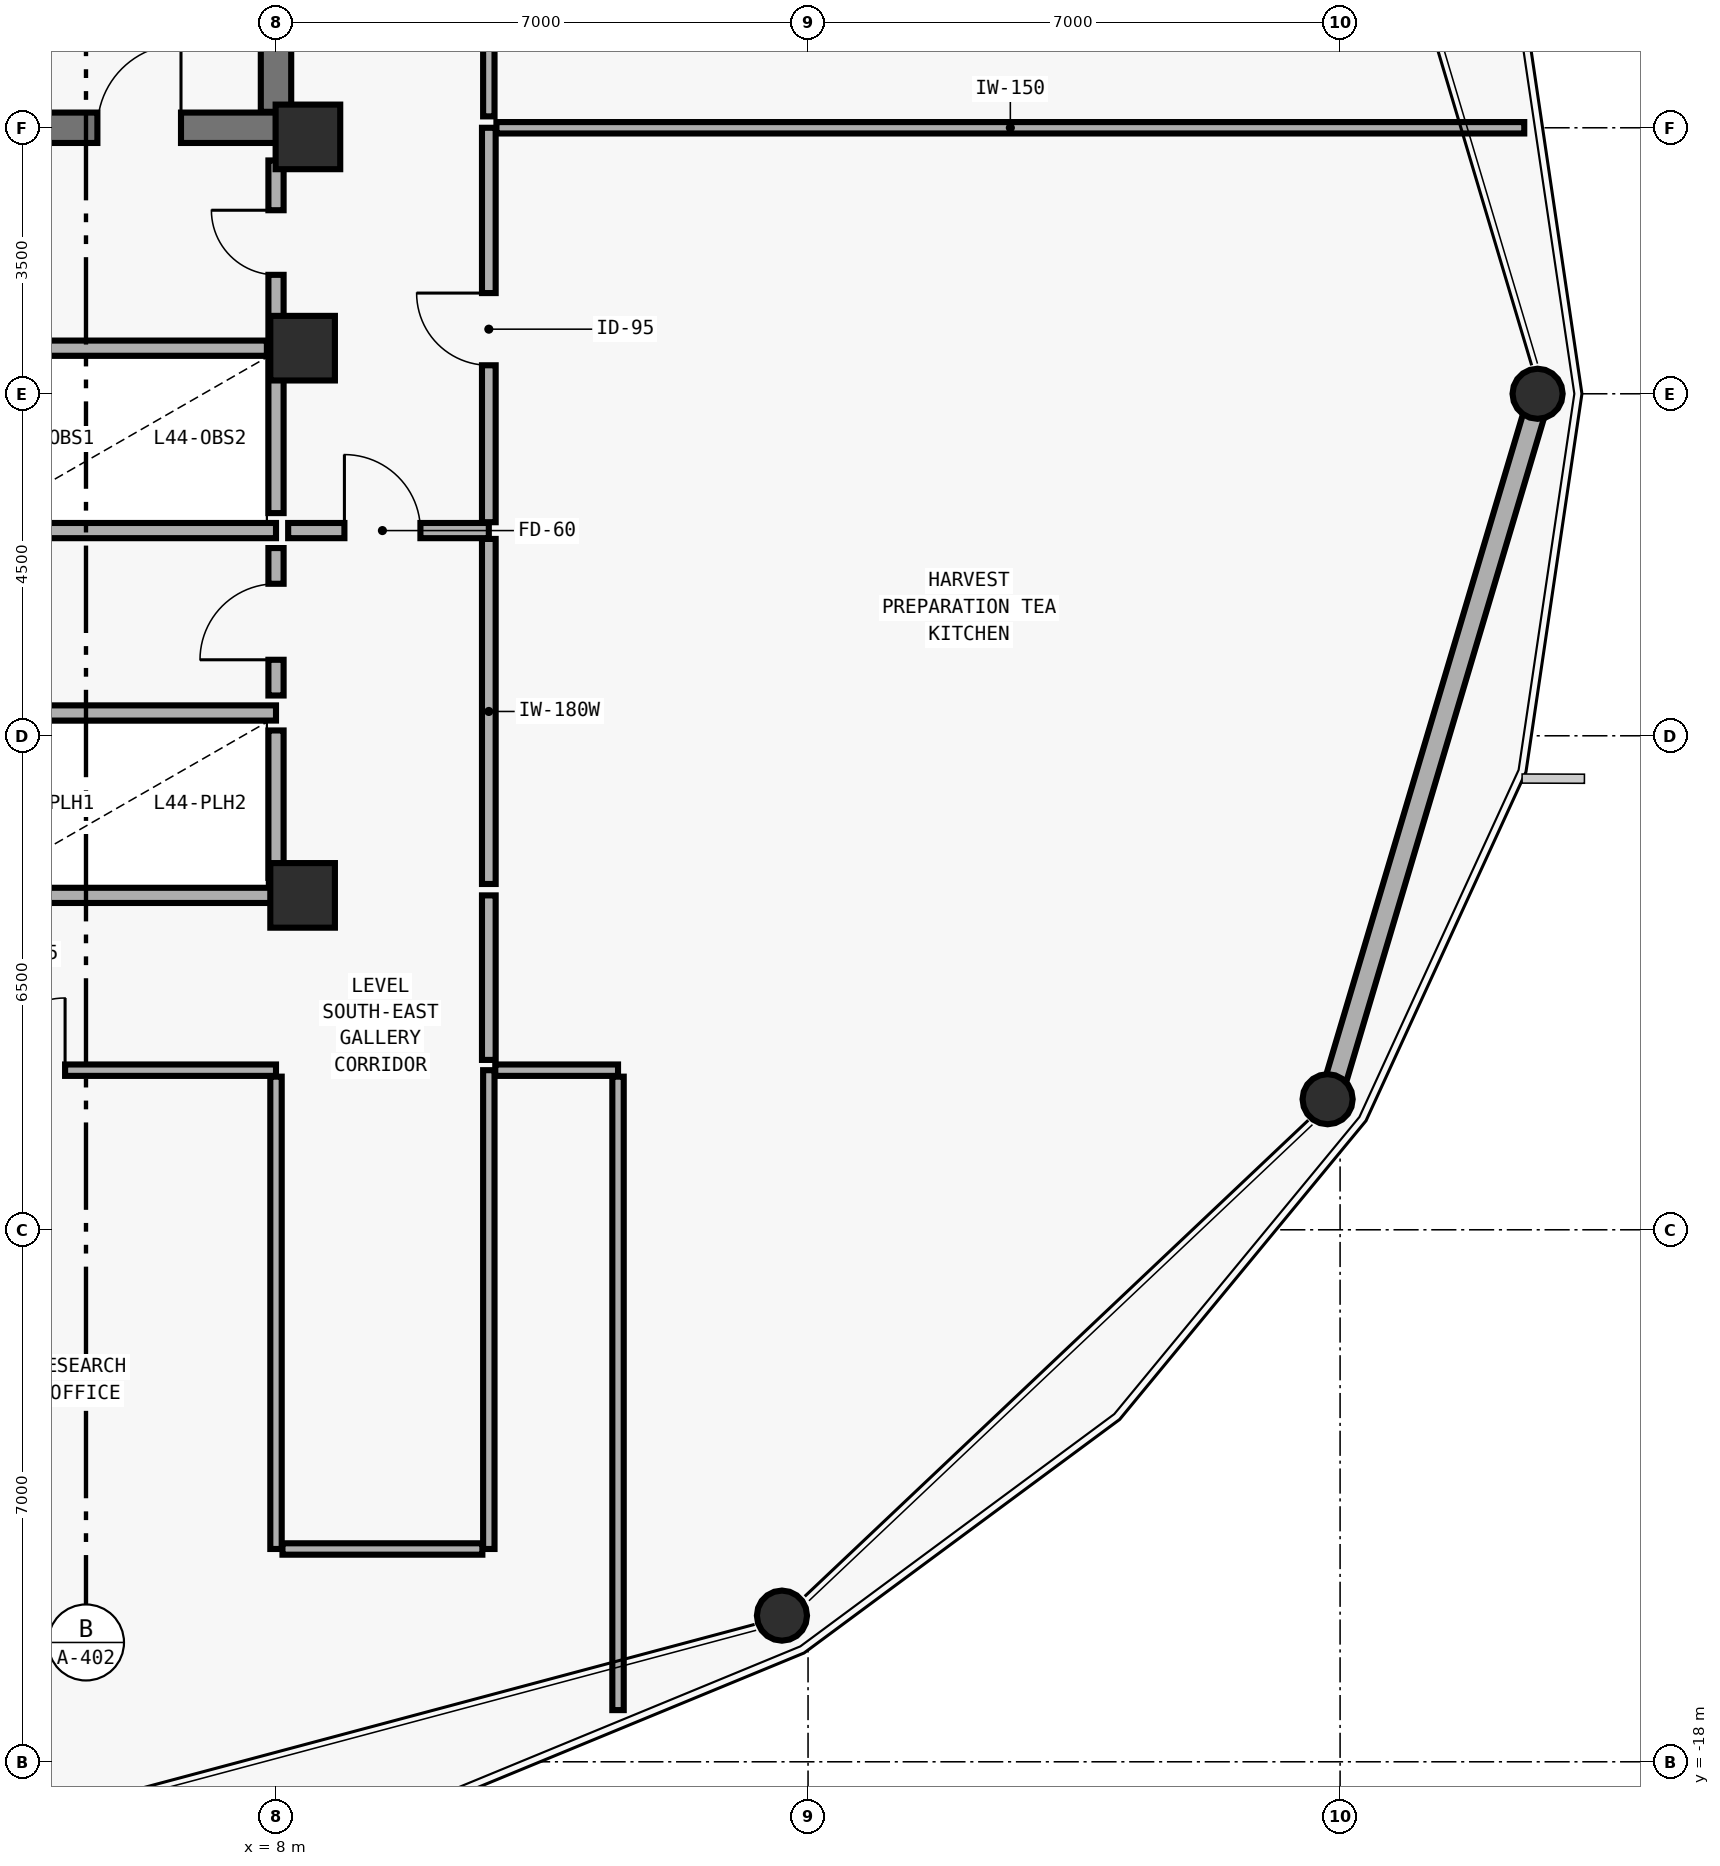
"""IFC4 building model, lengths in metres.
Left out: names, types, materials, properties, quantities, classifications, styles, units other than length and angle.
Written with IfcOpenShell. Run it as: python <this file> out.ifc"""

import sys

from ifc_helpers import new_model, si_unit, direction, frame, frame_2d, origin, origin_2d, place, context, subcontext, project, spatial, rectangle, hollow_circle, extrude, element, fill, save


model = new_model("IFC4")
c1 = context("Model", 3, precision=1e-05, world=origin(), true_north=direction((0.0, 1.0)))
c2 = subcontext(c1, "Body", "Model", "MODEL_VIEW")
j1 = project(units=[si_unit("LENGTHUNIT", "METRE"), si_unit("PLANEANGLEUNIT", "RADIAN")], contexts=[c1])
p1 = place(None, origin())
s1 = spatial("IfcSite", under=j1, at=p1, CompositionType="ELEMENT")
p2 = place(p1, origin())
s2 = spatial("IfcBuilding", under=s1, at=p2, CompositionType="ELEMENT")
p3 = place(p2, frame((0.0, 0.0, 178.8)))
s3 = spatial("IfcBuildingStorey", under=s2, at=p3, CompositionType="ELEMENT", Elevation=178.8)
p4 = place(p3, frame((-2.0, 3.5, 0.0), z_axis=(0.0, 0.0, 1.0), x_axis=(1.0, 0.0, 0.0)))
e1 = element("IfcWall", 1, at=p4, inside=s3, PredefinedType="SHEAR", context=c2, shape_type="SweptSolid", body=[
    extrude(rectangle(XDim=10.0, YDim=0.4, at=frame_2d((5.0, 0.0))), origin(), (0.0, 0.0, 1.0), 3.592),
])
p5 = place(p4, frame((1.65, 0.0, 0.0)))
e2 = element("IfcOpeningElement", 2, at=p5, cuts=e1, PredefinedType="OPENING", context=c2, shape_type="SweptSolid", body=[
    extrude(rectangle(XDim=1.1, YDim=2.15, at=frame_2d((0.55, 1.075))), frame((0.0, 0.21, 0.0), z_axis=(0.0, -1.0, 0.0), x_axis=(1.0, 0.0, 0.0)), (0.0, 0.0, 1.0), 0.42),
])
p6 = place(p4, frame((7.65, 0.0, 0.0)))
e3 = element("IfcOpeningElement", 3, at=p6, cuts=e1, PredefinedType="OPENING", context=c2, shape_type="SweptSolid", body=[
    extrude(rectangle(XDim=1.1, YDim=2.15, at=frame_2d((0.55, 1.075))), frame((0.0, 0.21, 0.0), z_axis=(0.0, -1.0, 0.0), x_axis=(1.0, 0.0, 0.0)), (0.0, 0.0, 1.0), 0.42),
])
p7 = place(p4, frame((3.72, 0.0, 0.0)))
e4 = element("IfcOpeningElement", 4, at=p7, cuts=e1, PredefinedType="OPENING", context=c2, shape_type="SweptSolid", body=[
    extrude(rectangle(XDim=1.1, YDim=2.2, at=frame_2d((0.55, 1.1))), frame((0.0, 0.21, 0.0), z_axis=(0.0, -1.0, 0.0), x_axis=(1.0, 0.0, 0.0)), (0.0, 0.0, 1.0), 0.42),
])
p8 = place(p4, frame((5.18, 0.0, 0.0)))
e5 = element("IfcOpeningElement", 5, at=p8, cuts=e1, PredefinedType="OPENING", context=c2, shape_type="SweptSolid", body=[
    extrude(rectangle(XDim=1.1, YDim=2.2, at=frame_2d((0.55, 1.1))), frame((0.0, 0.21, 0.0), z_axis=(0.0, -1.0, 0.0), x_axis=(1.0, 0.0, 0.0)), (0.0, 0.0, 1.0), 0.42),
])
p9 = place(p3, frame((8.0, 3.71, 0.0), z_axis=(0.0, 0.0, 1.0), x_axis=(0.0, 1.0, 0.0)))
e6 = element("IfcWall", 6, at=p9, inside=s3, PredefinedType="SHEAR", context=c2, shape_type="SweptSolid", body=[
    extrude(rectangle(XDim=8.58, YDim=0.4, at=frame_2d((4.29, 0.0))), origin(), (0.0, 0.0, 1.0), 3.592),
])
for number, where, z_axis, x_axis in (
    (7, (8.42, 3.38, 0.0), (0.0, 0.0, 1.0), (1.0, 0.0, 0.0)),
    (8, (8.35, 0.6, 0.0), (0.0, 0.0, 1.0), (1.0, 0.0, 0.0)),
    (9, (8.35, -6.6, 0.0), (0.0, 0.0, 1.0), (1.0, 0.0, 0.0)),
):
    element("IfcColumn", number, at=place(p3, frame(where, z_axis=z_axis, x_axis=x_axis)), inside=s3, PredefinedType="COLUMN", context=c2, shape_type="SweptSolid", body=[
        extrude(rectangle(XDim=0.85, YDim=0.85, at=origin_2d()), origin(), (0.0, 0.0, 1.0), 3.575),
    ])
p10 = place(p3, frame((24.632, 0.0, 0.0), z_axis=(-0.018776993553, 0.0, 0.999823696715), x_axis=(0.0, -1.0, 0.0)))
e10 = element("IfcColumn", 10, at=p10, inside=s3, PredefinedType="COLUMN", context=c2, shape_type="SweptSolid", body=[
    extrude(hollow_circle(Radius=0.33, WallThickness=0.025, at=origin_2d()), origin(), (0.0, 0.0, 1.0), 3.576),
])
p11 = place(p3, frame((14.674, -16.092, 0.0), z_axis=(-0.009423563403, 0.008194402959, 0.999922021066), x_axis=(-0.656178714925, -0.754605522164, 0.0)))
e11 = element("IfcColumn", 11, at=p11, inside=s3, PredefinedType="COLUMN", context=c2, shape_type="SweptSolid", body=[
    extrude(hollow_circle(Radius=0.33, WallThickness=0.025, at=origin_2d()), origin(), (0.0, 0.0, 1.0), 3.575),
])
p12 = place(p3, frame((21.865, -9.291, 0.0), z_axis=(-0.016182903558, 0.004779760545, 0.999857623625), x_axis=(-0.283261555535, -0.959042695168, 0.0)))
e12 = element("IfcColumn", 12, at=p12, inside=s3, PredefinedType="COLUMN", context=c2, shape_type="SweptSolid", body=[
    extrude(hollow_circle(Radius=0.33, WallThickness=0.025, at=origin_2d()), origin(), (0.0, 0.0, 1.0), 3.575),
])
p13 = place(p3, frame((24.551, -0.273, 0.0), z_axis=(0.0, 0.0, 1.0), x_axis=(-0.285437365911, -0.958397365471, 0.0)))
e13 = element("IfcWall", 13, at=p13, inside=s3, PredefinedType="SOLIDWALL", context=c2, shape_type="SweptSolid", body=[
    extrude(rectangle(XDim=9.124, YDim=0.28, at=frame_2d((4.562, 0.0))), origin(), (0.0, 0.0, 1.0), 2.93),
])
p14 = place(p3, frame((4.0, 0.6, 0.0), z_axis=(0.0, 0.0, 1.0), x_axis=(1.0, 0.0, 0.0)))
e14 = element("IfcWall", 14, at=p14, inside=s3, PredefinedType="SOLIDWALL", context=c2, shape_type="SweptSolid", body=[
    extrude(rectangle(XDim=3.88, YDim=0.2, at=frame_2d((1.94, 0.0))), origin(), (0.0, 0.0, 1.0), 3.012),
])
p15 = place(p3, frame((4.0, -1.8, 0.0), z_axis=(0.0, 0.0, 1.0), x_axis=(1.0, 0.0, 0.0)))
e15 = element("IfcWall", 15, at=p15, inside=s3, PredefinedType="SOLIDWALL", context=c2, shape_type="SweptSolid", body=[
    extrude(rectangle(XDim=4.0, YDim=0.2, at=frame_2d((2.0, 0.0))), origin(), (0.0, 0.0, 1.0), 3.36),
])
p16 = place(p3, frame((8.0, -1.57, 0.0), z_axis=(0.0, 0.0, 1.0), x_axis=(0.0, 1.0, 0.0)))
e16 = element("IfcWall", 16, at=p16, inside=s3, PredefinedType="SOLIDWALL", context=c2, shape_type="SweptSolid", body=[
    extrude(rectangle(XDim=2.05, YDim=0.2, at=frame_2d((1.025, 0.0))), origin(), (0.0, 0.0, 1.0), 3.012),
])
p17 = place(p3, frame((4.16, -4.2, 0.0), z_axis=(0.0, 0.0, 1.0), x_axis=(1.0, 0.0, 0.0)))
e17 = element("IfcWall", 17, at=p17, inside=s3, PredefinedType="SOLIDWALL", context=c2, shape_type="SweptSolid", body=[
    extrude(rectangle(XDim=3.84, YDim=0.2, at=frame_2d((1.92, 0.0))), origin(), (0.0, 0.0, 1.0), 3.36),
])
p18 = place(p3, frame((4.16, -6.6, 0.0), z_axis=(0.0, 0.0, 1.0), x_axis=(1.0, 0.0, 0.0)))
e18 = element("IfcWall", 18, at=p18, inside=s3, PredefinedType="SOLIDWALL", context=c2, shape_type="SweptSolid", body=[
    extrude(rectangle(XDim=3.84, YDim=0.2, at=frame_2d((1.92, 0.0))), origin(), (0.0, 0.0, 1.0), 3.012),
])
p19 = place(p3, frame((8.0, -6.37, 0.0), z_axis=(0.0, 0.0, 1.0), x_axis=(0.0, 1.0, 0.0)))
e19 = element("IfcWall", 19, at=p19, inside=s3, PredefinedType="SOLIDWALL", context=c2, shape_type="SweptSolid", body=[
    extrude(rectangle(XDim=1.94, YDim=0.2, at=frame_2d((0.97, 0.0))), origin(), (0.0, 0.0, 1.0), 3.012),
])
p20 = place(p3, frame((8.0, 0.72, 0.0), z_axis=(0.0, 0.0, 1.0), x_axis=(0.0, 1.0, 0.0)))
e20 = element("IfcWall", 20, at=p20, inside=s3, PredefinedType="MOVABLE", context=c2, shape_type="SweptSolid", body=[
    extrude(rectangle(XDim=2.35, YDim=0.2, at=frame_2d((1.175, 0.0))), origin(), (0.0, 0.0, 1.0), 2.692),
])
p21 = place(p20, frame((0.845, 0.0, 0.0)))
e21 = element("IfcOpeningElement", 21, at=p21, cuts=e20, PredefinedType="OPENING", context=c2, shape_type="SweptSolid", body=[
    extrude(rectangle(XDim=0.85, YDim=2.1, at=frame_2d((0.425, 1.05))), frame((0.0, 0.11, 0.0), z_axis=(0.0, -1.0, 0.0), x_axis=(1.0, 0.0, 0.0)), (0.0, 0.0, 1.0), 0.22),
])
p22 = place(p3, frame((8.0, -3.97, 0.0), z_axis=(0.0, 0.0, 1.0), x_axis=(0.0, 1.0, 0.0)))
e22 = element("IfcWall", 22, at=p22, inside=s3, PredefinedType="MOVABLE", context=c2, shape_type="SweptSolid", body=[
    extrude(rectangle(XDim=1.94, YDim=0.2, at=frame_2d((0.97, 0.0))), origin(), (0.0, 0.0, 1.0), 3.012),
])
p23 = place(p22, frame((0.47, 0.0, 0.0)))
e23 = element("IfcOpeningElement", 23, at=p23, cuts=e22, PredefinedType="OPENING", context=c2, shape_type="SweptSolid", body=[
    extrude(rectangle(XDim=1.0, YDim=2.1, at=frame_2d((0.5, 1.05))), frame((0.0, 0.11, 0.0), z_axis=(0.0, -1.0, 0.0), x_axis=(1.0, 0.0, 0.0)), (0.0, 0.0, 1.0), 0.22),
])
p24 = place(p3, frame((8.16, -1.8, 0.0), z_axis=(0.0, 0.0, 1.0), x_axis=(1.0, 0.0, 0.0)))
e24 = element("IfcWall", 24, at=p24, inside=s3, PredefinedType="MOVABLE", context=c2, shape_type="SweptSolid", body=[
    extrude(rectangle(XDim=2.64, YDim=0.2, at=frame_2d((1.32, 0.0))), origin(), (0.0, 0.0, 1.0), 3.36),
])
p25 = place(p24, frame((0.74, 0.0, 0.0)))
e25 = element("IfcOpeningElement", 25, at=p25, cuts=e24, PredefinedType="OPENING", context=c2, shape_type="SweptSolid", body=[
    extrude(rectangle(XDim=1.0, YDim=2.1, at=frame_2d((0.5, 1.05))), frame((0.0, 0.11, 0.0), z_axis=(0.0, -1.0, 0.0), x_axis=(1.0, 0.0, 0.0)), (0.0, 0.0, 1.0), 0.22),
])
p26 = place(p3, frame((1.635, -8.9, 0.0), z_axis=(0.0, 0.0, 1.0), x_axis=(1.0, 0.0, 0.0)))
e26 = element("IfcWall", 26, at=p26, inside=s3, PredefinedType="PARTITIONING", context=c2, shape_type="SweptSolid", body=[
    extrude(rectangle(XDim=6.365, YDim=0.15, at=frame_2d((3.183, 0.0))), origin(), (0.0, 0.0, 1.0), 3.36),
])
p27 = place(p26, frame((2.64, 0.0, 0.0)))
e27 = element("IfcOpeningElement", 27, at=p27, cuts=e26, PredefinedType="OPENING", context=c2, shape_type="SweptSolid", body=[
    extrude(rectangle(XDim=0.95, YDim=2.1, at=frame_2d((0.475, 1.05))), frame((0.0, 0.085, 0.0), z_axis=(0.0, -1.0, 0.0), x_axis=(1.0, 0.0, 0.0)), (0.0, 0.0, 1.0), 0.17),
])
p28 = place(p3, frame((10.8, -1.69, 0.0), z_axis=(0.0, 0.0, 1.0), x_axis=(0.0, 1.0, 0.0)))
e28 = element("IfcWall", 28, at=p28, inside=s3, PredefinedType="PLUMBINGWALL", context=c2, shape_type="SweptSolid", body=[
    extrude(rectangle(XDim=5.19, YDim=0.18, at=frame_2d((2.595, 0.0))), origin(), (0.0, 0.0, 1.0), 3.36),
])
p29 = place(p28, frame((2.065, 0.0, 0.0)))
e29 = element("IfcOpeningElement", 29, at=p29, cuts=e28, PredefinedType="OPENING", context=c2, shape_type="SweptSolid", body=[
    extrude(rectangle(XDim=0.95, YDim=2.1, at=frame_2d((0.475, 1.05))), frame((0.0, 0.1, 0.0), z_axis=(0.0, -1.0, 0.0), x_axis=(1.0, 0.0, 0.0)), (0.0, 0.0, 1.0), 0.2),
])
p30 = place(p3, frame((10.8, 3.65, 0.0), z_axis=(0.0, 0.0, 1.0), x_axis=(0.0, 1.0, 0.0)))
e30 = element("IfcWall", 30, at=p30, inside=s3, PredefinedType="PARTITIONING", context=c2, shape_type="SweptSolid", body=[
    extrude(rectangle(XDim=8.85, YDim=0.15, at=frame_2d((4.425, 0.0))), origin(), (0.0, 0.0, 1.0), 3.36),
])
p31 = place(p30, frame((3.875, 0.0, 0.0)))
e31 = element("IfcOpeningElement", 31, at=p31, cuts=e30, PredefinedType="OPENING", context=c2, shape_type="SweptSolid", body=[
    extrude(rectangle(XDim=0.95, YDim=2.1, at=frame_2d((0.475, 1.05))), frame((0.0, 0.085, 0.0), z_axis=(0.0, -1.0, 0.0), x_axis=(1.0, 0.0, 0.0)), (0.0, 0.0, 1.0), 0.17),
])
p32 = place(p3, frame((8.0, -8.985, 0.0), z_axis=(0.0, 0.0, 1.0), x_axis=(0.0, -1.0, 0.0)))
e32 = element("IfcWall", 32, at=p32, inside=s3, PredefinedType="PARTITIONING", context=c2, shape_type="SweptSolid", body=[
    extrude(rectangle(XDim=6.215, YDim=0.15, at=frame_2d((3.107, 0.0))), origin(), (0.0, 0.0, 1.0), 2.842),
])
p33 = place(p3, frame((10.8, -15.2, 0.0), z_axis=(0.0, 0.0, 1.0), x_axis=(0.0, 1.0, 0.0)))
e33 = element("IfcWall", 33, at=p33, inside=s3, PredefinedType="PARTITIONING", context=c2, shape_type="SweptSolid", body=[
    extrude(rectangle(XDim=6.3, YDim=0.15, at=frame_2d((3.15, 0.0))), origin(), (0.0, 0.0, 1.0), 3.36),
])
p34 = place(p3, frame((8.085, -15.2, 0.0), z_axis=(0.0, 0.0, 1.0), x_axis=(1.0, 0.0, 0.0)))
e34 = element("IfcWall", 34, at=p34, inside=s3, PredefinedType="PARTITIONING", context=c2, shape_type="SweptSolid", body=[
    extrude(rectangle(XDim=2.63, YDim=0.15, at=frame_2d((1.315, 0.0))), origin(), (0.0, 0.0, 1.0), 3.36),
])
p35 = place(p3, frame((10.885, -8.9, 0.0), z_axis=(0.0, 0.0, 1.0), x_axis=(1.0, 0.0, 0.0)))
e35 = element("IfcWall", 35, at=p35, inside=s3, PredefinedType="PARTITIONING", context=c2, shape_type="SweptSolid", body=[
    extrude(rectangle(XDim=1.615, YDim=0.15, at=frame_2d((0.808, 0.0))), origin(), (0.0, 0.0, 1.0), 3.36),
])
p36 = place(p3, frame((12.5, -8.985, 0.0), z_axis=(0.0, 0.0, 1.0), x_axis=(0.0, -1.0, 0.0)))
e36 = element("IfcWall", 36, at=p36, inside=s3, PredefinedType="PARTITIONING", context=c2, shape_type="SweptSolid", body=[
    extrude(rectangle(XDim=8.335, YDim=0.15, at=frame_2d((4.167, 0.0))), origin(), (0.0, 0.0, 1.0), 3.36),
])
p37 = place(p3, frame((10.8, -8.765, 0.0), z_axis=(0.0, 0.0, 1.0), x_axis=(0.0, 1.0, 0.0)))
e37 = element("IfcWall", 37, at=p37, inside=s3, PredefinedType="PLUMBINGWALL", context=c2, shape_type="SweptSolid", body=[
    extrude(rectangle(XDim=2.165, YDim=0.18, at=frame_2d((1.083, 0.0))), origin(), (0.0, 0.0, 1.0), 3.36),
])
p38 = place(p3, frame((10.8, -6.45, 0.0), z_axis=(0.0, 0.0, 1.0), x_axis=(0.0, 1.0, 0.0)))
e38 = element("IfcWall", 38, at=p38, inside=s3, PredefinedType="PLUMBINGWALL", context=c2, shape_type="SweptSolid", body=[
    extrude(rectangle(XDim=4.54, YDim=0.18, at=frame_2d((2.27, 0.0))), origin(), (0.0, 0.0, 1.0), 3.36),
])
p39 = place(p3, frame((10.9, 3.5, 0.0), z_axis=(0.0, 0.0, 1.0), x_axis=(1.0, 0.0, 0.0)))
e39 = element("IfcWall", 39, at=p39, inside=s3, PredefinedType="PARTITIONING", context=c2, shape_type="SweptSolid", body=[
    extrude(rectangle(XDim=13.523, YDim=0.15, at=frame_2d((6.762, 0.0))), origin(), (0.0, 0.0, 1.0), 3.36),
])
p40 = place(p6, origin())
e40 = element("IfcDoor", 40, at=p40, inside=s3, OperationType="SINGLE_SWING_RIGHT", PredefinedType="DOOR", context=c2, shape_type="SweptSolid", body=[
    extrude(rectangle(XDim=1.1, YDim=2.15, at=frame_2d((0.55, 1.075))), frame((0.0, 0.025, 0.0), z_axis=(0.0, -1.0, 0.0), x_axis=(1.0, 0.0, 0.0)), (0.0, 0.0, 1.0), 0.05),
])
fill(e3, e40)
p41 = place(p21, origin())
e41 = element("IfcDoor", 41, at=p41, inside=s3, OperationType="SINGLE_SWING_RIGHT", PredefinedType="DOOR", context=c2, shape_type="SweptSolid", body=[
    extrude(rectangle(XDim=0.85, YDim=2.1, at=frame_2d((0.425, 1.05))), frame((0.0, 0.025, 0.0), z_axis=(0.0, -1.0, 0.0), x_axis=(1.0, 0.0, 0.0)), (0.0, 0.0, 1.0), 0.05),
])
fill(e21, e41)
p42 = place(p23, origin())
e42 = element("IfcDoor", 42, at=p42, inside=s3, OperationType="SINGLE_SWING_LEFT", PredefinedType="DOOR", context=c2, shape_type="SweptSolid", body=[
    extrude(rectangle(XDim=1.0, YDim=2.1, at=frame_2d((0.5, 1.05))), frame((0.0, 0.025, 0.0), z_axis=(0.0, -1.0, 0.0), x_axis=(1.0, 0.0, 0.0)), (0.0, 0.0, 1.0), 0.05),
])
fill(e23, e42)
p43 = place(p25, origin())
e43 = element("IfcDoor", 43, at=p43, inside=s3, OperationType="SINGLE_SWING_LEFT", PredefinedType="DOOR", context=c2, shape_type="SweptSolid", body=[
    extrude(rectangle(XDim=1.0, YDim=2.1, at=frame_2d((0.5, 1.05))), frame((0.0, 0.025, 0.0), z_axis=(0.0, -1.0, 0.0), x_axis=(1.0, 0.0, 0.0)), (0.0, 0.0, 1.0), 0.05),
])
fill(e25, e43)
p44 = place(p27, origin())
e44 = element("IfcDoor", 44, at=p44, inside=s3, OperationType="SINGLE_SWING_RIGHT", PredefinedType="DOOR", context=c2, shape_type="SweptSolid", body=[
    extrude(rectangle(XDim=0.95, YDim=2.1, at=frame_2d((0.475, 1.05))), frame((0.0, 0.025, 0.0), z_axis=(0.0, -1.0, 0.0), x_axis=(1.0, 0.0, 0.0)), (0.0, 0.0, 1.0), 0.05),
])
fill(e27, e44)
p45 = place(p29, origin())
e45 = element("IfcDoor", 45, at=p45, inside=s3, OperationType="SINGLE_SWING_RIGHT", PredefinedType="DOOR", context=c2, shape_type="SweptSolid", body=[
    extrude(rectangle(XDim=0.95, YDim=2.1, at=frame_2d((0.475, 1.05))), frame((0.0, 0.025, 0.0), z_axis=(0.0, -1.0, 0.0), x_axis=(1.0, 0.0, 0.0)), (0.0, 0.0, 1.0), 0.05),
])
fill(e29, e45)
save(model, sys.argv[1])
